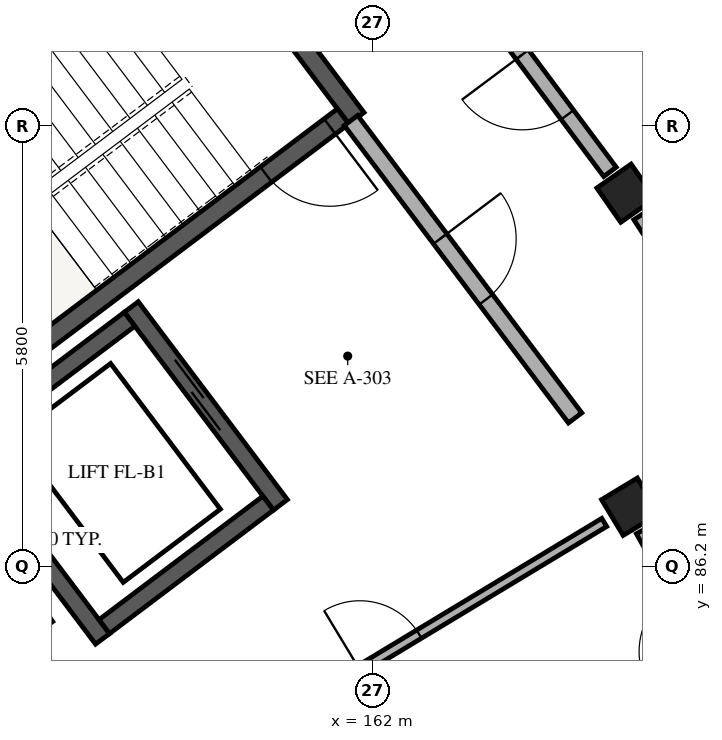
"""IFC4 building model, lengths in metres.
Left out: names, types, materials, properties, quantities, classifications, styles, units other than length and angle.
Written with IfcOpenShell. Run it as: python <this file> out.ifc"""

import sys

from ifc_helpers import new_model, si_unit, direction, frame, frame_2d, origin, origin_2d, place, context, subcontext, project, spatial, rectangle, extrude, element, fill, save


model = new_model("IFC4")
c1 = context("Model", 3, precision=1e-05, world=origin(), true_north=direction((0.0, 1.0)))
c2 = subcontext(c1, "Body", "Model", "MODEL_VIEW")
j1 = project(units=[si_unit("LENGTHUNIT", "METRE"), si_unit("PLANEANGLEUNIT", "RADIAN")], contexts=[c1])
p1 = place(None, origin())
s1 = spatial("IfcSite", under=j1, at=p1, CompositionType="ELEMENT")
p2 = place(p1, origin())
s2 = spatial("IfcBuilding", under=s1, at=p2, CompositionType="ELEMENT")
p3 = place(p2, frame((0.0, 0.0, 8.84)))
s3 = spatial("IfcBuildingStorey", under=s2, at=p3, CompositionType="ELEMENT", Elevation=8.84)
p4 = place(p3, frame((159.707, 94.658, 0.0), z_axis=(0.0, 0.0, 1.0), x_axis=(-0.798639633744, -0.601809550782, 0.0)))
e1 = element("IfcWall", 1, at=p4, inside=s3, PredefinedType="SHEAR", context=c2, shape_type="SweptSolid", body=[
    extrude(rectangle(XDim=6.6, YDim=0.25, at=frame_2d((3.3, 0.0))), origin(), (0.0, 0.0, 1.0), 3.11),
])
p5 = place(p3, frame((159.731, 94.833, 0.0), z_axis=(0.0, 0.0, 1.0), x_axis=(0.601814606132, -0.798635824294, 0.0)))
e2 = element("IfcWall", 2, at=p5, inside=s3, PredefinedType="SHEAR", context=c2, shape_type="SweptSolid", body=[
    extrude(rectangle(XDim=3.42, YDim=0.25, at=frame_2d((1.71, 0.0))), origin(), (0.0, 0.0, 1.0), 3.11),
])
p6 = place(p3, frame((161.615, 92.126, 0.0), z_axis=(0.0, 0.0, 1.0), x_axis=(-0.798639633744, -0.601809550782, 0.0)))
e3 = element("IfcWall", 3, at=p6, inside=s3, PredefinedType="SHEAR", context=c2, shape_type="SweptSolid", body=[
    extrude(rectangle(XDim=6.6, YDim=0.25, at=frame_2d((3.3, 0.0))), origin(), (0.0, 0.0, 1.0), 3.11),
])
p7 = place(p6, frame((0.22, 0.0, 0.0)))
e4 = element("IfcOpeningElement", 4, at=p7, cuts=e3, PredefinedType="OPENING", context=c2, shape_type="SweptSolid", body=[
    extrude(rectangle(XDim=1.05, YDim=2.15, at=frame_2d((0.525, 1.075))), frame((0.0, 0.135, 0.0), z_axis=(0.0, -1.0, 0.0), x_axis=(1.0, 0.0, 0.0)), (0.0, 0.0, 1.0), 0.27),
])
p8 = place(p3, frame((158.827, 89.619, 0.0), z_axis=(0.0, 0.0, 1.0), x_axis=(0.601819781152, -0.798631924615, 0.0)))
e5 = element("IfcWall", 5, at=p8, inside=s3, PredefinedType="SHEAR", context=c2, shape_type="SweptSolid", body=[
    extrude(rectangle(XDim=3.26, YDim=0.23, at=frame_2d((1.63, 0.0))), origin(), (0.0, 0.0, 1.0), 3.11),
])
p9 = place(p8, frame((0.9, 0.0, 0.0)))
e6 = element("IfcOpeningElement", 6, at=p9, cuts=e5, PredefinedType="OPENING", context=c2, shape_type="SweptSolid", body=[
    extrude(rectangle(XDim=1.1, YDim=2.15, at=frame_2d((0.55, 1.075))), frame((0.0, 0.125, 0.0), z_axis=(0.0, -1.0, 0.0), x_axis=(1.0, 0.0, 0.0)), (0.0, 0.0, 1.0), 0.25),
])
p10 = place(p3, frame((156.487, 87.856, 0.0), z_axis=(0.0, 0.0, 1.0), x_axis=(0.601819781152, -0.798631924615, 0.0)))
e7 = element("IfcWall", 7, at=p10, inside=s3, PredefinedType="SHEAR", context=c2, shape_type="SweptSolid", body=[
    extrude(rectangle(XDim=3.26, YDim=0.23, at=frame_2d((1.63, 0.0))), origin(), (0.0, 0.0, 1.0), 3.11),
])
for number, where, z_axis, x_axis in (
    (8, (158.805, 89.458, 0.0), (0.0, 0.0, 1.0), (-0.799, -0.602, 0.0)),
    (9, (160.628, 87.038, 0.0), (0.0, 0.0, 1.0), (-0.799, -0.602, 0.0)),
):
    element("IfcWall", number, at=place(p3, frame(where, z_axis=z_axis, x_axis=x_axis)), inside=s3, PredefinedType="SHEAR", context=c2, shape_type="SweptSolid", body=[
        extrude(rectangle(XDim=2.7, YDim=0.23, at=frame_2d((1.35, 0.0))), origin(), (0.0, 0.0, 1.0), 3.11),
    ])
p11 = place(p3, frame((165.392, 86.991, 0.0), z_axis=(0.0, 0.0, 1.0), x_axis=(0.856166891514, 0.516699384434, 0.0)))
e10 = element("IfcColumn", 10, at=p11, inside=s3, PredefinedType="COLUMN", context=c2, shape_type="SweptSolid", body=[
    extrude(rectangle(XDim=0.55, YDim=0.55, at=origin_2d()), origin(), (0.0, 0.0, 1.0), 3.105),
])
p12 = place(p3, frame((157.461, 85.625, 0.0), z_axis=(0.0, 0.0, 1.0), x_axis=(0.820262803018, 0.571986830255, 0.0)))
e11 = element("IfcColumn", 11, at=p12, inside=s3, PredefinedType="PILASTER", context=c2, shape_type="SweptSolid", body=[
    extrude(rectangle(XDim=0.38, YDim=0.62, at=origin_2d()), origin(), (0.0, 0.0, 1.0), 3.105),
])
p13 = place(p3, frame((165.335, 91.116, 0.0), z_axis=(0.0, 0.0, 1.0), x_axis=(0.820262803018, 0.571986830255, 0.0)))
e12 = element("IfcColumn", 12, at=p13, inside=s3, PredefinedType="COLUMN", context=c2, shape_type="SweptSolid", body=[
    extrude(rectangle(XDim=0.55, YDim=0.55, at=origin_2d()), origin(), (0.0, 0.0, 1.0), 3.105),
])
p14 = place(p3, frame((161.718, 92.073, 0.0), z_axis=(0.0, 0.0, 1.0), x_axis=(0.601792209296, -0.79865270101, 0.0)))
e13 = element("IfcWall", 13, at=p14, inside=s3, PredefinedType="PARTITIONING", context=c2, shape_type="SweptSolid", body=[
    extrude(rectangle(XDim=4.9, YDim=0.22, at=frame_2d((2.45, 0.0))), origin(), (0.0, 0.0, 1.0), 2.34),
])
p15 = place(p14, frame((1.95, 0.0, 0.0)))
e14 = element("IfcOpeningElement", 14, at=p15, cuts=e13, PredefinedType="OPENING", context=c2, shape_type="SweptSolid", body=[
    extrude(rectangle(XDim=1.0, YDim=2.15, at=frame_2d((0.5, 1.075))), frame((0.0, 0.12, 0.0), z_axis=(0.0, -1.0, 0.0), x_axis=(1.0, 0.0, 0.0)), (0.0, 0.0, 1.0), 0.24),
])
p16 = place(p3, frame((166.89, 84.313, 0.0), z_axis=(0.0, 0.0, 1.0), x_axis=(-0.48819576874, 0.872734147025, 0.0)))
e15 = element("IfcWall", 15, at=p16, inside=s3, PredefinedType="PARTITIONING", context=c2, shape_type="SweptSolid", body=[
    extrude(rectangle(XDim=2.718, YDim=0.205, at=frame_2d((1.359, 0.0))), origin(), (0.0, 0.0, 1.0), 2.37),
])
p17 = place(p16, frame((0.884, 0.0, 0.0)))
e16 = element("IfcOpeningElement", 16, at=p17, cuts=e15, PredefinedType="OPENING", context=c2, shape_type="SweptSolid", body=[
    extrude(rectangle(XDim=0.95, YDim=2.13, at=frame_2d((0.475, 1.065))), frame((0.0, 0.113, 0.0), z_axis=(0.0, -1.0, 0.0), x_axis=(1.0, 0.0, 0.0)), (0.0, 0.0, 1.0), 0.225),
])
p18 = place(p3, frame((159.399, 83.374, 0.0), z_axis=(0.0, 0.0, 1.0), x_axis=(0.85616819337, 0.516697227263, 0.0)))
e17 = element("IfcWall", 17, at=p18, inside=s3, PredefinedType="PARTITIONING", context=c2, shape_type="SweptSolid", body=[
    extrude(rectangle(XDim=6.6, YDim=0.125, at=frame_2d((3.3, 0.0))), origin(), (0.0, 0.0, 1.0), 2.37),
])
p19 = place(p18, frame((2.845, 0.0, 0.0)))
e18 = element("IfcOpeningElement", 18, at=p19, cuts=e17, PredefinedType="OPENING", context=c2, shape_type="SweptSolid", body=[
    extrude(rectangle(XDim=0.91, YDim=2.1, at=frame_2d((0.455, 1.05))), frame((0.0, 0.073, 0.0), z_axis=(0.0, -1.0, 0.0), x_axis=(1.0, 0.0, 0.0)), (0.0, 0.0, 1.0), 0.145),
])
p20 = place(p3, frame((167.085, 88.421, 0.0), z_axis=(0.0, 0.0, 1.0), x_axis=(-0.544643612649, 0.838667595178, 0.0)))
e19 = element("IfcWall", 19, at=p20, inside=s3, PredefinedType="PARTITIONING", context=c2, shape_type="SweptSolid", body=[
    extrude(rectangle(XDim=2.863, YDim=0.205, at=frame_2d((1.432, 0.0))), origin(), (0.0, 0.0, 1.0), 2.37),
])
p21 = place(p20, frame((0.967, 0.0, 0.0)))
e20 = element("IfcOpeningElement", 20, at=p21, cuts=e19, PredefinedType="OPENING", context=c2, shape_type="SweptSolid", body=[
    extrude(rectangle(XDim=0.93, YDim=2.12, at=frame_2d((0.465, 1.06))), frame((0.0, 0.113, 0.0), z_axis=(0.0, -1.0, 0.0), x_axis=(1.0, 0.0, 0.0)), (0.0, 0.0, 1.0), 0.225),
])
p22 = place(p3, frame((165.126, 91.396, 0.0), z_axis=(0.0, 0.0, 1.0), x_axis=(-0.598757763243, 0.800930172335, 0.0)))
e21 = element("IfcWall", 21, at=p22, inside=s3, PredefinedType="PARTITIONING", context=c2, shape_type="SweptSolid", body=[
    extrude(rectangle(XDim=2.863, YDim=0.205, at=frame_2d((1.432, 0.0))), origin(), (0.0, 0.0, 1.0), 2.37),
])
p23 = place(p22, frame((0.937, 0.0, 0.0)))
e22 = element("IfcOpeningElement", 22, at=p23, cuts=e21, PredefinedType="OPENING", context=c2, shape_type="SweptSolid", body=[
    extrude(rectangle(XDim=0.99, YDim=2.16, at=frame_2d((0.495, 1.08))), frame((0.0, 0.113, 0.0), z_axis=(0.0, -1.0, 0.0), x_axis=(1.0, 0.0, 0.0)), (0.0, 0.0, 1.0), 0.225),
])
p24 = place(p7, origin())
e23 = element("IfcDoor", 23, at=p24, inside=s3, OperationType="SINGLE_SWING_LEFT", PredefinedType="DOOR", context=c2, shape_type="SweptSolid", body=[
    extrude(rectangle(XDim=1.05, YDim=2.15, at=frame_2d((0.525, 1.075))), frame((0.0, 0.025, 0.0), z_axis=(0.0, -1.0, 0.0), x_axis=(1.0, 0.0, 0.0)), (0.0, 0.0, 1.0), 0.05),
])
fill(e4, e23)
p25 = place(p9, origin())
e24 = element("IfcDoor", 24, at=p25, inside=s3, OperationType="DOUBLE_DOOR_SLIDING", PredefinedType="DOOR", context=c2, shape_type="SweptSolid", body=[
    extrude(rectangle(XDim=1.1, YDim=2.15, at=frame_2d((0.55, 1.075))), frame((0.0, 0.025, 0.0), z_axis=(0.0, -1.0, 0.0), x_axis=(1.0, 0.0, 0.0)), (0.0, 0.0, 1.0), 0.05),
])
fill(e6, e24)
p26 = place(p15, origin())
e25 = element("IfcDoor", 25, at=p26, inside=s3, OperationType="SINGLE_SWING_LEFT", PredefinedType="DOOR", context=c2, shape_type="SweptSolid", body=[
    extrude(rectangle(XDim=1.0, YDim=2.15, at=frame_2d((0.5, 1.075))), frame((0.0, 0.025, 0.0), z_axis=(0.0, -1.0, 0.0), x_axis=(1.0, 0.0, 0.0)), (0.0, 0.0, 1.0), 0.05),
])
fill(e14, e25)
p27 = place(p19, origin())
e26 = element("IfcDoor", 26, at=p27, inside=s3, OperationType="SINGLE_SWING_LEFT", PredefinedType="DOOR", context=c2, shape_type="SweptSolid", body=[
    extrude(rectangle(XDim=0.91, YDim=2.1, at=frame_2d((0.455, 1.05))), frame((0.0, 0.025, 0.0), z_axis=(0.0, -1.0, 0.0), x_axis=(1.0, 0.0, 0.0)), (0.0, 0.0, 1.0), 0.05),
])
fill(e18, e26)
p28 = place(p23, origin())
e27 = element("IfcDoor", 27, at=p28, inside=s3, OperationType="SINGLE_SWING_RIGHT", PredefinedType="DOOR", context=c2, shape_type="SweptSolid", body=[
    extrude(rectangle(XDim=0.99, YDim=2.16, at=frame_2d((0.495, 1.08))), frame((0.0, 0.025, 0.0), z_axis=(0.0, -1.0, 0.0), x_axis=(1.0, 0.0, 0.0)), (0.0, 0.0, 1.0), 0.05),
])
fill(e22, e27)
save(model, sys.argv[1])
